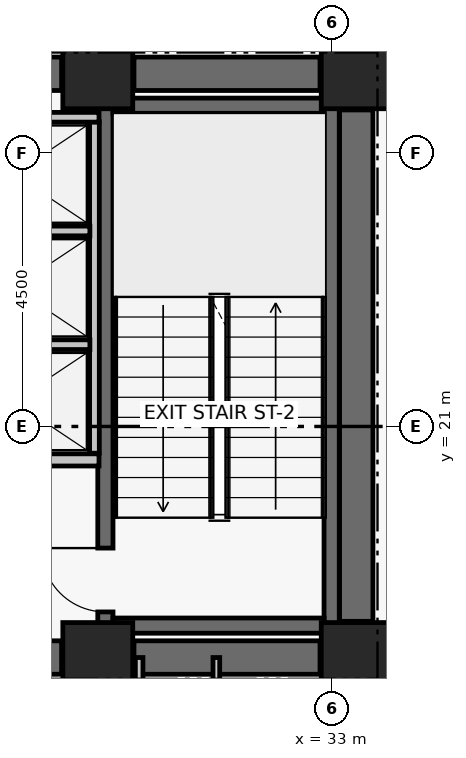
"""IFC4 building model, lengths in metres.
Left out: names, types, materials, properties, quantities, classifications, styles, units other than length and angle.
Written with IfcOpenShell. Run it as: python <this file> out.ifc"""

import sys

from ifc_helpers import new_model, si_unit, direction, frame, frame_2d, origin, origin_2d, place, context, subcontext, project, spatial, rectangle, extrude, element, fill, save


model = new_model("IFC4")
c1 = context("Model", 3, precision=1e-05, world=origin(), true_north=direction((0.0, 1.0)))
c2 = subcontext(c1, "Body", "Model", "MODEL_VIEW")
j1 = project(units=[si_unit("LENGTHUNIT", "METRE"), si_unit("PLANEANGLEUNIT", "RADIAN")], contexts=[c1])
p1 = place(None, origin())
s1 = spatial("IfcSite", under=j1, at=p1, CompositionType="ELEMENT")
p2 = place(p1, origin())
s2 = spatial("IfcBuilding", under=s1, at=p2, CompositionType="ELEMENT")
p3 = place(p2, frame((0.0, 0.0, 100.26)))
s3 = spatial("IfcBuildingStorey", under=s2, at=p3, CompositionType="ELEMENT", Elevation=100.26)
for number, where, z_axis, x_axis in (
    (1, (29.15, 17.2, 0.0), (0.0, 0.0, 1.0), (1.0, 0.0, 0.0)),
    (2, (33.4, 17.2, 0.0), (0.0, 0.0, 1.0), (1.0, 0.0, 0.0)),
    (3, (29.15, 26.8, 0.0), (0.0, 0.0, 1.0), (1.0, 0.0, 0.0)),
    (4, (33.4, 26.8, 0.0), (0.0, 0.0, 1.0), (1.0, 0.0, 0.0)),
):
    element("IfcColumn", number, at=place(p3, frame(where, z_axis=z_axis, x_axis=x_axis)), inside=s3, PredefinedType="COLUMN", context=c2, shape_type="SweptSolid", body=[
        extrude(rectangle(XDim=1.15, YDim=1.15, at=origin_2d()), origin(), (0.0, 0.0, 1.0), 3.72),
    ])
p4 = place(p3, frame((26.85, 17.2, 0.0), z_axis=(0.0, 0.0, 1.0), x_axis=(1.0, 0.0, 0.0)))
e5 = element("IfcWall", 5, at=p4, inside=s3, PredefinedType="SHEAR", context=c2, shape_type="SweptSolid", body=[
    extrude(rectangle(XDim=1.705, YDim=0.55, at=frame_2d((0.853, 0.0))), origin(), (0.0, 0.0, 1.0), 3.44),
])
p5 = place(p3, frame((29.745, 17.2, 0.0), z_axis=(0.0, 0.0, 1.0), x_axis=(1.0, 0.0, 0.0)))
e6 = element("IfcWall", 6, at=p5, inside=s3, PredefinedType="SHEAR", context=c2, shape_type="SweptSolid", body=[
    extrude(rectangle(XDim=3.06, YDim=0.55, at=frame_2d((1.53, 0.0))), origin(), (0.0, 0.0, 1.0), 3.44),
])
p6 = place(p3, frame((26.85, 26.8, 0.0), z_axis=(0.0, 0.0, 1.0), x_axis=(1.0, 0.0, 0.0)))
e7 = element("IfcWall", 7, at=p6, inside=s3, PredefinedType="SHEAR", context=c2, shape_type="SweptSolid", body=[
    extrude(rectangle(XDim=1.705, YDim=0.55, at=frame_2d((0.853, 0.0))), origin(), (0.0, 0.0, 1.0), 3.44),
])
p7 = place(p3, frame((29.745, 26.8, 0.0), z_axis=(0.0, 0.0, 1.0), x_axis=(1.0, 0.0, 0.0)))
e8 = element("IfcWall", 8, at=p7, inside=s3, PredefinedType="SHEAR", context=c2, shape_type="SweptSolid", body=[
    extrude(rectangle(XDim=3.06, YDim=0.55, at=frame_2d((1.53, 0.0))), origin(), (0.0, 0.0, 1.0), 3.44),
])
p8 = place(p3, frame((33.4, 17.795, 0.0), z_axis=(0.0, 0.0, 1.0), x_axis=(0.0, 1.0, 0.0)))
e9 = element("IfcWall", 9, at=p8, inside=s3, PredefinedType="SHEAR", context=c2, shape_type="SweptSolid", body=[
    extrude(rectangle(XDim=8.41, YDim=0.55, at=frame_2d((4.205, 0.0))), origin(), (0.0, 0.0, 1.0), 3.44),
])
p9 = place(p3, frame((29.275, 17.6, 0.0), z_axis=(0.0, 0.0, 1.0), x_axis=(0.0, 1.0, 0.0)))
e10 = element("IfcWall", 10, at=p9, inside=s3, PredefinedType="SHEAR", context=c2, shape_type="SweptSolid", body=[
    extrude(rectangle(XDim=8.8, YDim=0.25, at=frame_2d((4.4, 0.0))), origin(), (0.0, 0.0, 1.0), 3.44),
])
p10 = place(p9, frame((0.35, 0.0, 0.0)))
e11 = element("IfcOpeningElement", 11, at=p10, cuts=e10, PredefinedType="OPENING", context=c2, shape_type="SweptSolid", body=[
    extrude(rectangle(XDim=1.05, YDim=2.08, at=frame_2d((0.525, 1.04))), frame((0.0, 0.135, 0.0), z_axis=(0.0, -1.0, 0.0), x_axis=(1.0, 0.0, 0.0)), (0.0, 0.0, 1.0), 0.27),
])
p11 = place(p3, frame((32.996, 17.6, 0.0), z_axis=(0.0, 0.0, 1.0), x_axis=(0.0, 1.0, 0.0)))
e12 = element("IfcWall", 12, at=p11, inside=s3, PredefinedType="SHEAR", context=c2, shape_type="SweptSolid", body=[
    extrude(rectangle(XDim=8.8, YDim=0.25, at=frame_2d((4.4, 0.0))), origin(), (0.0, 0.0, 1.0), 3.44),
])
for number, where, z_axis, x_axis in (
    (13, (29.4, 17.725, 0.0), (0.0, 0.0, 1.0), (1.0, 0.0, 0.0)),
    (14, (29.4, 26.275, 0.0), (0.0, 0.0, 1.0), (1.0, 0.0, 0.0)),
):
    element("IfcWall", number, at=place(p3, frame(where, z_axis=z_axis, x_axis=x_axis)), inside=s3, PredefinedType="SHEAR", context=c2, shape_type="SweptSolid", body=[
        extrude(rectangle(XDim=3.471, YDim=0.25, at=frame_2d((1.736, 0.0))), origin(), (0.0, 0.0, 1.0), 3.44),
    ])
p12 = place(p3, frame((26.37, 20.45, 0.0), z_axis=(0.0, 0.0, 1.0), x_axis=(1.0, 0.0, 0.0)))
e15 = element("IfcWall", 15, at=p12, inside=s3, PredefinedType="PARTITIONING", context=c2, shape_type="SweptSolid", body=[
    extrude(rectangle(XDim=2.8, YDim=0.2, at=frame_2d((1.4, 0.0))), origin(), (0.0, 0.0, 1.0), 3.44),
])
p13 = place(p12, frame((0.78, 0.0, 0.0)))
e16 = element("IfcOpeningElement", 16, at=p13, cuts=e15, PredefinedType="OPENING", context=c2, shape_type="SweptSolid", body=[
    extrude(rectangle(XDim=1.1, YDim=2.08, at=frame_2d((0.55, 1.04))), frame((0.0, 0.11, 0.0), z_axis=(0.0, -1.0, 0.0), x_axis=(1.0, 0.0, 0.0)), (0.0, 0.0, 1.0), 0.22),
])
p14 = place(p3, frame((29.095, 20.56, 0.0), z_axis=(0.0, 0.0, 1.0), x_axis=(0.0, 1.0, 0.0)))
e17 = element("IfcWall", 17, at=p14, inside=s3, PredefinedType="PARTITIONING", context=c2, shape_type="SweptSolid", body=[
    extrude(rectangle(XDim=5.45, YDim=0.16, at=frame_2d((2.725, 0.0))), origin(), (0.0, 0.0, 1.0), 3.44),
])
p15 = place(p3, frame((26.37, 22.345, 0.0), z_axis=(0.0, 0.0, 1.0), x_axis=(1.0, 0.0, 0.0)))
e18 = element("IfcWall", 18, at=p15, inside=s3, PredefinedType="PARTITIONING", context=c2, shape_type="SweptSolid", body=[
    extrude(rectangle(XDim=2.65, YDim=0.16, at=frame_2d((1.325, 0.0))), origin(), (0.0, 0.0, 1.0), 3.44),
])
p16 = place(p3, frame((26.53, 24.215, 0.0), z_axis=(0.0, 0.0, 1.0), x_axis=(1.0, 0.0, 0.0)))
e19 = element("IfcWall", 19, at=p16, inside=s3, PredefinedType="PARTITIONING", context=c2, shape_type="SweptSolid", body=[
    extrude(rectangle(XDim=2.49, YDim=0.16, at=frame_2d((1.245, 0.0))), origin(), (0.0, 0.0, 1.0), 3.44),
])
p17 = place(p3, frame((26.34, 26.085, 0.0), z_axis=(0.0, 0.0, 1.0), x_axis=(1.0, 0.0, 0.0)))
e20 = element("IfcWall", 20, at=p17, inside=s3, PredefinedType="PARTITIONING", context=c2, shape_type="SweptSolid", body=[
    extrude(rectangle(XDim=2.83, YDim=0.16, at=frame_2d((1.415, 0.0))), origin(), (0.0, 0.0, 1.0), 3.44),
])
p18 = place(p3, frame((29.83, 14.95, 0.0), z_axis=(0.0, 0.0, 1.0), x_axis=(0.0, 1.0, 0.0)))
e21 = element("IfcWall", 21, at=p18, inside=s3, PredefinedType="PARTITIONING", context=c2, shape_type="SweptSolid", body=[
    extrude(rectangle(XDim=2.25, YDim=0.125, at=frame_2d((1.125, 0.0))), origin(), (0.0, 0.0, 1.0), 2.57),
])
p19 = place(p3, frame((31.1, 14.95, 0.0), z_axis=(0.0, 0.0, 1.0), x_axis=(0.0, 1.0, 0.0)))
e22 = element("IfcWall", 22, at=p19, inside=s3, PredefinedType="PARTITIONING", context=c2, shape_type="SweptSolid", body=[
    extrude(rectangle(XDim=2.25, YDim=0.11, at=frame_2d((1.125, 0.0))), origin(), (0.0, 0.0, 1.0), 2.57),
])
p20 = place(p3, frame((33.74, 27.22, 0.0), z_axis=(0.0, 0.0, 1.0), x_axis=(-1.0, 0.0, 0.0)))
e23 = element("IfcWall", 23, at=p20, inside=s3, PredefinedType="PARTITIONING", context=c2, shape_type="SweptSolid", body=[
    extrude(rectangle(XDim=0.86, YDim=0.145, at=frame_2d((0.43, 0.0))), origin(), (0.0, 0.0, 1.0), 2.17),
])
p21 = place(p10, origin())
e24 = element("IfcDoor", 24, at=p21, inside=s3, OperationType="SINGLE_SWING_RIGHT", PredefinedType="DOOR", context=c2, shape_type="SweptSolid", body=[
    extrude(rectangle(XDim=1.05, YDim=2.08, at=frame_2d((0.525, 1.04))), frame((0.0, 0.025, 0.0), z_axis=(0.0, -1.0, 0.0), x_axis=(1.0, 0.0, 0.0)), (0.0, 0.0, 1.0), 0.05),
])
fill(e11, e24)
save(model, sys.argv[1])
